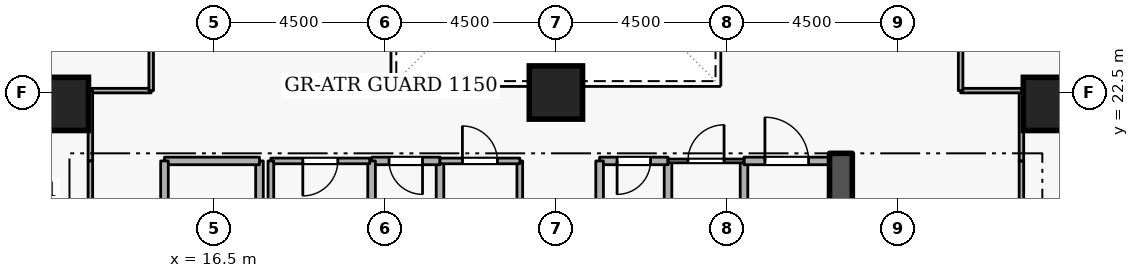
"""IFC4 building model, lengths in metres.
Left out: names, types, materials, properties, quantities, classifications, styles, units other than length and angle.
Written with IfcOpenShell. Run it as: python <this file> out.ifc"""

import sys

from ifc_helpers import new_model, si_unit, direction, frame, frame_2d, origin, origin_2d, place, context, subcontext, project, spatial, rectangle, extrude, element, fill, save


model = new_model("IFC4")
c1 = context("Model", 3, precision=1e-05, world=origin(), true_north=direction((0.0, 1.0)))
c2 = subcontext(c1, "Body", "Model", "MODEL_VIEW")
j1 = project(units=[si_unit("LENGTHUNIT", "METRE"), si_unit("PLANEANGLEUNIT", "RADIAN")], contexts=[c1])
p1 = place(None, origin())
s1 = spatial("IfcSite", under=j1, at=p1, CompositionType="ELEMENT")
p2 = place(p1, origin())
s2 = spatial("IfcBuilding", under=s1, at=p2, CompositionType="ELEMENT")
p3 = place(p2, frame((0.0, 0.0, 31.5)))
s3 = spatial("IfcBuildingStorey", under=s2, at=p3, CompositionType="ELEMENT", Elevation=31.5)
p4 = place(p3, frame((33.0, 15.2, 0.0), z_axis=(0.0, 0.0, 1.0), x_axis=(0.0, 1.0, 0.0)))
e1 = element("IfcWall", 1, at=p4, inside=s3, PredefinedType="SHEAR", context=c2, shape_type="SweptSolid", body=[
    extrude(rectangle(XDim=5.7, YDim=0.6, at=frame_2d((2.85, 0.0))), origin(), (0.0, 0.0, 1.0), 3.6),
])
for number, where, z_axis, x_axis in (
    (2, (12.5, 22.2, 0.0), (0.0, 0.0, 1.0), (1.0, 0.0, 0.0)),
    (3, (38.5, 22.2, 0.0), (0.0, 0.0, 1.0), (1.0, 0.0, 0.0)),
    (4, (25.5, 22.5, 0.0), (0.0, 0.0, 1.0), (1.0, 0.0, 0.0)),
):
    element("IfcColumn", number, at=place(p3, frame(where, z_axis=z_axis, x_axis=x_axis)), inside=s3, PredefinedType="COLUMN", context=c2, shape_type="SweptSolid", body=[
        extrude(rectangle(XDim=1.4, YDim=1.4, at=origin_2d()), origin(), (0.0, 0.0, 1.0), 3.6),
    ])
p5 = place(p3, frame((17.7, 18.4, 0.0), z_axis=(0.0, 0.0, 1.0), x_axis=(0.0, 1.0, 0.0)))
e5 = element("IfcWall", 5, at=p5, inside=s3, PredefinedType="STANDARD", context=c2, shape_type="SweptSolid", body=[
    extrude(rectangle(XDim=2.3, YDim=0.2, at=frame_2d((1.15, 0.0))), origin(), (0.0, 0.0, 1.0), 2.545),
])
p6 = place(p3, frame((17.7, 20.7, 0.0), z_axis=(0.0, 0.0, 1.0), x_axis=(-1.0, 0.0, 0.0)))
e6 = element("IfcWall", 6, at=p6, inside=s3, PredefinedType="STANDARD", context=c2, shape_type="SweptSolid", body=[
    extrude(rectangle(XDim=2.5, YDim=0.2, at=frame_2d((1.25, 0.0))), origin(), (0.0, 0.0, 1.0), 3.34),
])
p7 = place(p3, frame((15.2, 20.7, 0.0), z_axis=(0.0, 0.0, 1.0), x_axis=(0.0, -1.0, 0.0)))
e7 = element("IfcWall", 7, at=p7, inside=s3, PredefinedType="STANDARD", context=c2, shape_type="SweptSolid", body=[
    extrude(rectangle(XDim=5.7, YDim=0.2, at=frame_2d((2.85, 0.0))), origin(), (0.0, 0.0, 1.0), 3.34),
])
p8 = place(p7, frame((2.275, 0.0, 0.0)))
e8 = element("IfcOpeningElement", 8, at=p8, cuts=e7, PredefinedType="OPENING", context=c2, shape_type="SweptSolid", body=[
    extrude(rectangle(XDim=1.15, YDim=2.1, at=frame_2d((0.575, 1.05))), frame((0.0, 0.11, 0.0), z_axis=(0.0, -1.0, 0.0), x_axis=(1.0, 0.0, 0.0)), (0.0, 0.0, 1.0), 0.22),
])
p9 = place(p3, frame((28.45, 18.65, 0.0), z_axis=(0.0, 0.0, 1.0), x_axis=(0.0, 1.0, 0.0)))
e9 = element("IfcWall", 9, at=p9, inside=s3, PredefinedType="STANDARD", context=c2, shape_type="SweptSolid", body=[
    extrude(rectangle(XDim=2.05, YDim=0.2, at=frame_2d((1.025, 0.0))), origin(), (0.0, 0.0, 1.0), 3.34),
])
p10 = place(p3, frame((28.45, 20.7, 0.0), z_axis=(0.0, 0.0, 1.0), x_axis=(-1.0, 0.0, 0.0)))
e10 = element("IfcWall", 10, at=p10, inside=s3, PredefinedType="STANDARD", context=c2, shape_type="SweptSolid", body=[
    extrude(rectangle(XDim=1.8, YDim=0.2, at=frame_2d((0.9, 0.0))), origin(), (0.0, 0.0, 1.0), 3.34),
])
p11 = place(p10, frame((0.46, 0.0, 0.0)))
e11 = element("IfcOpeningElement", 11, at=p11, cuts=e10, PredefinedType="OPENING", context=c2, shape_type="SweptSolid", body=[
    extrude(rectangle(XDim=0.88, YDim=2.04, at=frame_2d((0.44, 1.02))), frame((0.0, 0.11, 0.0), z_axis=(0.0, -1.0, 0.0), x_axis=(1.0, 0.0, 0.0)), (0.0, 0.0, 1.0), 0.22),
])
for number, where, z_axis, x_axis in (
    (12, (26.65, 20.7, 0.0), (0.0, 0.0, 1.0), (0.0, -1.0, 0.0)),
    (13, (22.45, 18.65, 0.0), (0.0, 0.0, 1.0), (0.0, 1.0, 0.0)),
):
    element("IfcWall", number, at=place(p3, frame(where, z_axis=z_axis, x_axis=x_axis)), inside=s3, PredefinedType="STANDARD", context=c2, shape_type="SweptSolid", body=[
        extrude(rectangle(XDim=2.05, YDim=0.2, at=frame_2d((1.025, 0.0))), origin(), (0.0, 0.0, 1.0), 3.34),
    ])
p12 = place(p3, frame((22.45, 20.7, 0.0), z_axis=(0.0, 0.0, 1.0), x_axis=(-1.0, 0.0, 0.0)))
e14 = element("IfcWall", 14, at=p12, inside=s3, PredefinedType="STANDARD", context=c2, shape_type="SweptSolid", body=[
    extrude(rectangle(XDim=1.8, YDim=0.2, at=frame_2d((0.9, 0.0))), origin(), (0.0, 0.0, 1.0), 3.34),
])
p13 = place(p12, frame((0.46, 0.0, 0.0)))
e15 = element("IfcOpeningElement", 15, at=p13, cuts=e14, PredefinedType="OPENING", context=c2, shape_type="SweptSolid", body=[
    extrude(rectangle(XDim=0.88, YDim=2.04, at=frame_2d((0.44, 1.02))), frame((0.0, 0.11, 0.0), z_axis=(0.0, -1.0, 0.0), x_axis=(1.0, 0.0, 0.0)), (0.0, 0.0, 1.0), 0.22),
])
for number, where, z_axis, x_axis in (
    (16, (20.65, 20.7, 0.0), (0.0, 0.0, 1.0), (0.0, -1.0, 0.0)),
    (17, (30.45, 18.65, 0.0), (0.0, 0.0, 1.0), (0.0, 1.0, 0.0)),
):
    element("IfcWall", number, at=place(p3, frame(where, z_axis=z_axis, x_axis=x_axis)), inside=s3, PredefinedType="STANDARD", context=c2, shape_type="SweptSolid", body=[
        extrude(rectangle(XDim=2.05, YDim=0.2, at=frame_2d((1.025, 0.0))), origin(), (0.0, 0.0, 1.0), 3.34),
    ])
p14 = place(p3, frame((30.45, 20.7, 0.0), z_axis=(0.0, 0.0, 1.0), x_axis=(1.0, 0.0, 0.0)))
e18 = element("IfcWall", 18, at=p14, inside=s3, PredefinedType="STANDARD", context=c2, shape_type="SweptSolid", body=[
    extrude(rectangle(XDim=2.25, YDim=0.2, at=frame_2d((1.125, 0.0))), origin(), (0.0, 0.0, 1.0), 3.34),
])
p15 = place(p14, frame((0.55, 0.0, 0.0)))
e19 = element("IfcOpeningElement", 19, at=p15, cuts=e18, PredefinedType="OPENING", context=c2, shape_type="SweptSolid", body=[
    extrude(rectangle(XDim=1.15, YDim=2.1, at=frame_2d((0.575, 1.05))), frame((0.0, 0.11, 0.0), z_axis=(0.0, -1.0, 0.0), x_axis=(1.0, 0.0, 0.0)), (0.0, 0.0, 1.0), 0.22),
])
p16 = place(p3, frame((20.6, 20.7, 0.0), z_axis=(0.0, 0.0, 1.0), x_axis=(-1.0, 0.0, 0.0)))
e20 = element("IfcWall", 20, at=p16, inside=s3, PredefinedType="PARTITIONING", context=c2, shape_type="SweptSolid", body=[
    extrude(rectangle(XDim=2.6, YDim=0.15, at=frame_2d((1.3, 0.0))), origin(), (0.0, 0.0, 1.0), 3.34),
])
p17 = place(p16, frame((0.84, 0.0, 0.0)))
e21 = element("IfcOpeningElement", 21, at=p17, cuts=e20, PredefinedType="OPENING", context=c2, shape_type="SweptSolid", body=[
    extrude(rectangle(XDim=0.92, YDim=2.08, at=frame_2d((0.46, 1.04))), frame((0.0, 0.085, 0.0), z_axis=(0.0, -1.0, 0.0), x_axis=(1.0, 0.0, 0.0)), (0.0, 0.0, 1.0), 0.17),
])
p18 = place(p3, frame((18.0, 20.7, 0.0), z_axis=(0.0, 0.0, 1.0), x_axis=(0.0, -1.0, 0.0)))
e22 = element("IfcWall", 22, at=p18, inside=s3, PredefinedType="PARTITIONING", context=c2, shape_type="SweptSolid", body=[
    extrude(rectangle(XDim=2.05, YDim=0.15, at=frame_2d((1.025, 0.0))), origin(), (0.0, 0.0, 1.0), 2.545),
])
p19 = place(p3, frame((24.55, 20.7, 0.0), z_axis=(0.0, 0.0, 1.0), x_axis=(0.0, -1.0, 0.0)))
e23 = element("IfcWall", 23, at=p19, inside=s3, PredefinedType="PARTITIONING", context=c2, shape_type="SweptSolid", body=[
    extrude(rectangle(XDim=2.05, YDim=0.15, at=frame_2d((1.025, 0.0))), origin(), (0.0, 0.0, 1.0), 3.34),
])
p20 = place(p3, frame((22.45, 20.7, 0.0), z_axis=(0.0, 0.0, 1.0), x_axis=(1.0, 0.0, 0.0)))
e24 = element("IfcWall", 24, at=p20, inside=s3, PredefinedType="PARTITIONING", context=c2, shape_type="SweptSolid", body=[
    extrude(rectangle(XDim=2.1, YDim=0.15, at=frame_2d((1.05, 0.0))), origin(), (0.0, 0.0, 1.0), 3.34),
])
p21 = place(p20, frame((0.59, 0.0, 0.0)))
e25 = element("IfcOpeningElement", 25, at=p21, cuts=e24, PredefinedType="OPENING", context=c2, shape_type="SweptSolid", body=[
    extrude(rectangle(XDim=0.92, YDim=2.08, at=frame_2d((0.46, 1.04))), frame((0.0, 0.085, 0.0), z_axis=(0.0, -1.0, 0.0), x_axis=(1.0, 0.0, 0.0)), (0.0, 0.0, 1.0), 0.17),
])
p22 = place(p3, frame((28.45, 20.7, 0.0), z_axis=(0.0, 0.0, 1.0), x_axis=(1.0, 0.0, 0.0)))
e26 = element("IfcWall", 26, at=p22, inside=s3, PredefinedType="PARTITIONING", context=c2, shape_type="SweptSolid", body=[
    extrude(rectangle(XDim=2.0, YDim=0.1, at=frame_2d((1.0, 0.0))), origin(), (0.0, 0.0, 1.0), 3.34),
])
p23 = place(p22, frame((0.525, 0.0, 0.0)))
e27 = element("IfcOpeningElement", 27, at=p23, cuts=e26, PredefinedType="OPENING", context=c2, shape_type="SweptSolid", body=[
    extrude(rectangle(XDim=0.95, YDim=2.1, at=frame_2d((0.475, 1.05))), frame((0.0, 0.06, 0.0), z_axis=(0.0, -1.0, 0.0), x_axis=(1.0, 0.0, 0.0)), (0.0, 0.0, 1.0), 0.12),
])
p24 = place(p3, frame((14.85, 22.55, 0.0), z_axis=(0.0, 0.0, 1.0), x_axis=(-1.0, 0.0, 0.0)))
e28 = element("IfcWall", 28, at=p24, inside=s3, PredefinedType="PARTITIONING", context=c2, shape_type="SweptSolid", body=[
    extrude(rectangle(XDim=1.6, YDim=0.12, at=frame_2d((0.8, 0.0))), origin(), (0.0, 0.0, 1.0), 3.34),
])
p25 = place(p3, frame((13.25, 22.55, 0.0), z_axis=(0.0, 0.0, 1.0), x_axis=(0.0, -1.0, 0.0)))
e29 = element("IfcWall", 29, at=p25, inside=s3, PredefinedType="PARTITIONING", context=c2, shape_type="SweptSolid", body=[
    extrude(rectangle(XDim=1.85, YDim=0.12, at=frame_2d((0.925, 0.0))), origin(), (0.0, 0.0, 1.0), 3.34),
])
p26 = place(p3, frame((13.25, 20.7, 0.0), z_axis=(0.0, 0.0, 1.0), x_axis=(0.0, -1.0, 0.0)))
e30 = element("IfcWall", 30, at=p26, inside=s3, PredefinedType="PARTITIONING", context=c2, shape_type="SweptSolid", body=[
    extrude(rectangle(XDim=9.35, YDim=0.12, at=frame_2d((4.675, 0.0))), origin(), (0.0, 0.0, 1.0), 3.34),
])
p27 = place(p26, frame((4.15, 0.0, 0.0)))
e31 = element("IfcOpeningElement", 31, at=p27, cuts=e30, PredefinedType="OPENING", context=c2, shape_type="SweptSolid", body=[
    extrude(rectangle(XDim=1.05, YDim=2.1, at=frame_2d((0.525, 1.05))), frame((0.0, 0.07, 0.0), z_axis=(0.0, -1.0, 0.0), x_axis=(1.0, 0.0, 0.0)), (0.0, 0.0, 1.0), 0.14),
])
p28 = place(p3, frame((14.85, 27.0, 0.0), z_axis=(0.0, 0.0, 1.0), x_axis=(0.0, -1.0, 0.0)))
e32 = element("IfcWall", 32, at=p28, inside=s3, PredefinedType="PARTITIONING", context=c2, shape_type="SweptSolid", body=[
    extrude(rectangle(XDim=4.45, YDim=0.12, at=frame_2d((2.225, 0.0))), origin(), (0.0, 0.0, 1.0), 3.34),
])
p29 = place(p3, frame((37.75, 17.55, 0.0), z_axis=(0.0, 0.0, 1.0), x_axis=(0.0, 1.0, 0.0)))
e33 = element("IfcWall", 33, at=p29, inside=s3, PredefinedType="PARTITIONING", context=c2, shape_type="SweptSolid", body=[
    extrude(rectangle(XDim=3.15, YDim=0.12, at=frame_2d((1.575, 0.0))), origin(), (0.0, 0.0, 1.0), 3.34),
])
p30 = place(p3, frame((37.75, 20.7, 0.0), z_axis=(0.0, 0.0, 1.0), x_axis=(0.0, 1.0, 0.0)))
e34 = element("IfcWall", 34, at=p30, inside=s3, PredefinedType="PARTITIONING", context=c2, shape_type="SweptSolid", body=[
    extrude(rectangle(XDim=1.85, YDim=0.12, at=frame_2d((0.925, 0.0))), origin(), (0.0, 0.0, 1.0), 3.34),
])
p31 = place(p3, frame((37.75, 22.55, 0.0), z_axis=(0.0, 0.0, 1.0), x_axis=(-1.0, 0.0, 0.0)))
e35 = element("IfcWall", 35, at=p31, inside=s3, PredefinedType="PARTITIONING", context=c2, shape_type="SweptSolid", body=[
    extrude(rectangle(XDim=1.6, YDim=0.12, at=frame_2d((0.8, 0.0))), origin(), (0.0, 0.0, 1.0), 3.34),
])
p32 = place(p3, frame((36.15, 22.55, 0.0), z_axis=(0.0, 0.0, 1.0), x_axis=(0.0, 1.0, 0.0)))
e36 = element("IfcWall", 36, at=p32, inside=s3, PredefinedType="PARTITIONING", context=c2, shape_type="SweptSolid", body=[
    extrude(rectangle(XDim=4.45, YDim=0.12, at=frame_2d((2.225, 0.0))), origin(), (0.0, 0.0, 1.0), 3.34),
])
p33 = place(p32, frame((1.7, 0.0, 0.0)))
e37 = element("IfcOpeningElement", 37, at=p33, cuts=e36, PredefinedType="OPENING", context=c2, shape_type="SweptSolid", body=[
    extrude(rectangle(XDim=1.05, YDim=2.1, at=frame_2d((0.525, 1.05))), frame((0.0, 0.07, 0.0), z_axis=(0.0, -1.0, 0.0), x_axis=(1.0, 0.0, 0.0)), (0.0, 0.0, 1.0), 0.14),
])
p34 = place(p11, origin())
e38 = element("IfcDoor", 38, at=p34, inside=s3, OperationType="SINGLE_SWING_RIGHT", PredefinedType="DOOR", context=c2, shape_type="SweptSolid", body=[
    extrude(rectangle(XDim=0.88, YDim=2.04, at=frame_2d((0.44, 1.02))), frame((0.0, 0.025, 0.0), z_axis=(0.0, -1.0, 0.0), x_axis=(1.0, 0.0, 0.0)), (0.0, 0.0, 1.0), 0.05),
])
fill(e11, e38)
p35 = place(p13, origin())
e39 = element("IfcDoor", 39, at=p35, inside=s3, OperationType="SINGLE_SWING_LEFT", PredefinedType="DOOR", context=c2, shape_type="SweptSolid", body=[
    extrude(rectangle(XDim=0.88, YDim=2.04, at=frame_2d((0.44, 1.02))), frame((0.0, 0.025, 0.0), z_axis=(0.0, -1.0, 0.0), x_axis=(1.0, 0.0, 0.0)), (0.0, 0.0, 1.0), 0.05),
])
fill(e15, e39)
p36 = place(p17, origin())
e40 = element("IfcDoor", 40, at=p36, inside=s3, OperationType="SINGLE_SWING_RIGHT", PredefinedType="DOOR", context=c2, shape_type="SweptSolid", body=[
    extrude(rectangle(XDim=0.92, YDim=2.08, at=frame_2d((0.46, 1.04))), frame((0.0, 0.025, 0.0), z_axis=(0.0, -1.0, 0.0), x_axis=(1.0, 0.0, 0.0)), (0.0, 0.0, 1.0), 0.05),
])
fill(e21, e40)
p37 = place(p21, origin())
e41 = element("IfcDoor", 41, at=p37, inside=s3, OperationType="SINGLE_SWING_LEFT", PredefinedType="DOOR", context=c2, shape_type="SweptSolid", body=[
    extrude(rectangle(XDim=0.92, YDim=2.08, at=frame_2d((0.46, 1.04))), frame((0.0, 0.025, 0.0), z_axis=(0.0, -1.0, 0.0), x_axis=(1.0, 0.0, 0.0)), (0.0, 0.0, 1.0), 0.05),
])
fill(e25, e41)
p38 = place(p23, origin())
e42 = element("IfcDoor", 42, at=p38, inside=s3, OperationType="SINGLE_SWING_RIGHT", PredefinedType="DOOR", context=c2, shape_type="SweptSolid", body=[
    extrude(rectangle(XDim=0.95, YDim=2.1, at=frame_2d((0.475, 1.05))), frame((0.0, 0.025, 0.0), z_axis=(0.0, -1.0, 0.0), x_axis=(1.0, 0.0, 0.0)), (0.0, 0.0, 1.0), 0.05),
])
fill(e27, e42)
p39 = place(p15, origin())
e43 = element("IfcDoor", 43, at=p39, inside=s3, OperationType="SINGLE_SWING_LEFT", PredefinedType="DOOR", context=c2, shape_type="SweptSolid", body=[
    extrude(rectangle(XDim=1.15, YDim=2.1, at=frame_2d((0.575, 1.05))), frame((0.0, 0.025, 0.0), z_axis=(0.0, -1.0, 0.0), x_axis=(1.0, 0.0, 0.0)), (0.0, 0.0, 1.0), 0.05),
])
fill(e19, e43)
save(model, sys.argv[1])
